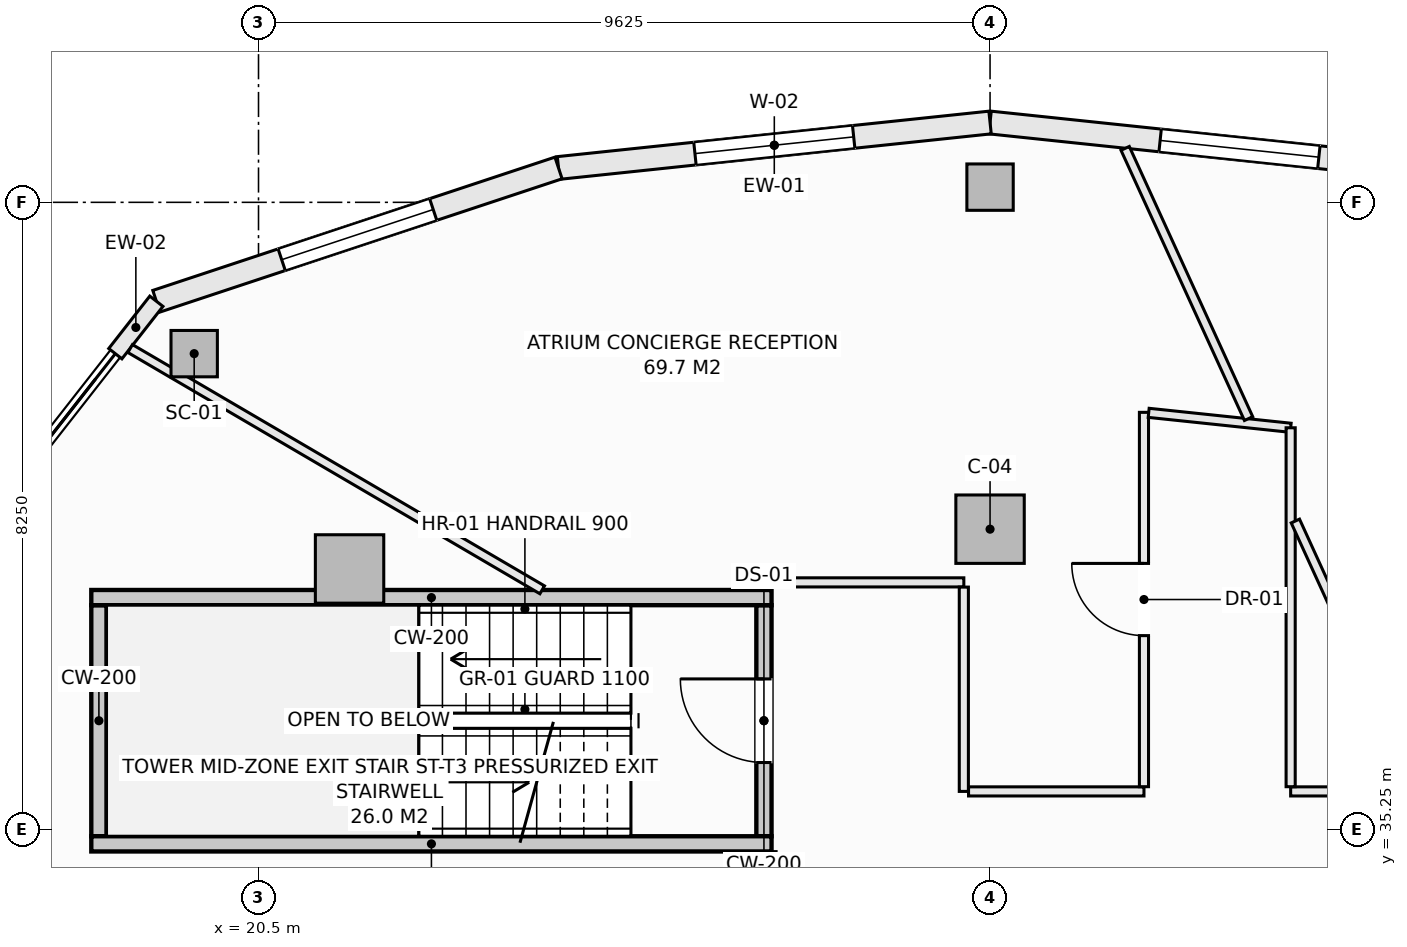
"""IFC4 building model, lengths in metres.
Left out: names, types, materials, properties, quantities, classifications, styles, units other than length and angle.
Written with IfcOpenShell. Run it as: python <this file> out.ifc"""

import sys

from ifc_helpers import new_model, si_unit, direction, frame, frame_2d, origin, origin_2d, place, context, subcontext, project, spatial, rectangle, hollow_rectangle, extrude, element, fill, save


model = new_model("IFC4")
c1 = context("Model", 3, precision=1e-05, world=origin(), true_north=direction((0.0, 1.0)))
c2 = subcontext(c1, "Body", "Model", "MODEL_VIEW")
j1 = project(units=[si_unit("LENGTHUNIT", "METRE"), si_unit("PLANEANGLEUNIT", "RADIAN")], contexts=[c1])
p1 = place(None, origin())
s1 = spatial("IfcSite", under=j1, at=p1, CompositionType="ELEMENT")
p2 = place(p1, origin())
s2 = spatial("IfcBuilding", under=s1, at=p2, CompositionType="ELEMENT")
p3 = place(p2, frame((0.0, 0.0, 142.7)))
s3 = spatial("IfcBuildingStorey", under=s2, at=p3, CompositionType="ELEMENT", Elevation=142.7)
for number, where, z_axis, x_axis in (
    (1, (30.125, 43.7, -0.27), (0.0, 0.0, 1.0), (1.0, 0.0, 0.0)),
    (2, (19.654, 41.51, -0.27), (0.0, 0.0, 1.0), (1.0, 0.0, 0.0)),
):
    element("IfcColumn", number, at=place(p3, frame(where, z_axis=z_axis, x_axis=x_axis)), inside=s3, PredefinedType="COLUMN", context=c2, shape_type="SweptSolid", body=[
        extrude(hollow_rectangle(XDim=0.61, YDim=0.61, WallThickness=0.025, at=origin_2d()), origin(), (0.0, 0.0, 1.0), 3.4),
    ])
for number, where, z_axis, x_axis in (
    (3, (30.125, 39.2, -0.27), (0.0, 0.0, 1.0), (1.0, 0.0, 0.0)),
    (4, (21.698, 38.677, -0.27), (0.0, 0.0, 1.0), (1.0, 0.0, 0.0)),
):
    element("IfcColumn", number, at=place(p3, frame(where, z_axis=z_axis, x_axis=x_axis)), inside=s3, PredefinedType="COLUMN", context=c2, shape_type="SweptSolid", body=[
        extrude(rectangle(XDim=0.9, YDim=0.9, at=origin_2d()), origin(), (0.0, 0.0, 1.0), 3.4),
    ])
p4 = place(p3, frame((30.125, 44.55, 0.0), z_axis=(0.0, 0.0, 1.0), x_axis=(0.994496545245, -0.104769372887, 0.0)))
e5 = element("IfcWall", 5, at=p4, inside=s3, PredefinedType="SOLIDWALL", context=c2, shape_type="SweptSolid", body=[
    extrude(rectangle(XDim=5.709, YDim=0.3, at=frame_2d((2.854, 0.0))), origin(), (0.0, 0.0, 1.0), 2.653),
])
p5 = place(p4, frame((2.25, 0.0, 0.74)))
e6 = element("IfcOpeningElement", 6, at=p5, cuts=e5, PredefinedType="OPENING", context=c2, shape_type="SweptSolid", body=[
    extrude(rectangle(XDim=2.1, YDim=1.7, at=frame_2d((1.05, 0.85))), frame((0.0, 0.16, 0.0), z_axis=(0.0, -1.0, 0.0), x_axis=(1.0, 0.0, 0.0)), (0.0, 0.0, 1.0), 0.32),
])
p6 = place(p3, frame((24.447, 43.952, 0.0), z_axis=(0.0, 0.0, 1.0), x_axis=(0.994496545245, 0.104769372887, 0.0)))
e7 = element("IfcWall", 7, at=p6, inside=s3, PredefinedType="SOLIDWALL", context=c2, shape_type="SweptSolid", body=[
    extrude(rectangle(XDim=5.709, YDim=0.3, at=frame_2d((2.854, 0.0))), origin(), (0.0, 0.0, 1.0), 2.653),
])
p7 = place(p6, frame((1.805, 0.0, 0.74)))
e8 = element("IfcOpeningElement", 8, at=p7, cuts=e7, PredefinedType="OPENING", context=c2, shape_type="SweptSolid", body=[
    extrude(rectangle(XDim=2.1, YDim=1.7, at=frame_2d((1.05, 0.85))), frame((0.0, 0.16, 0.0), z_axis=(0.0, -1.0, 0.0), x_axis=(1.0, 0.0, 0.0)), (0.0, 0.0, 1.0), 0.32),
])
p8 = place(p3, frame((19.156, 42.199, 0.0), z_axis=(0.0, 0.0, 1.0), x_axis=(0.949246811547, 0.314532177636, 0.0)))
e9 = element("IfcWall", 9, at=p8, inside=s3, PredefinedType="SOLIDWALL", context=c2, shape_type="SweptSolid", body=[
    extrude(rectangle(XDim=5.574, YDim=0.3, at=frame_2d((2.787, 0.0))), origin(), (0.0, 0.0, 1.0), 2.653),
])
p9 = place(p8, frame((1.737, 0.0, 0.74)))
e10 = element("IfcOpeningElement", 10, at=p9, cuts=e9, PredefinedType="OPENING", context=c2, shape_type="SweptSolid", body=[
    extrude(rectangle(XDim=2.1, YDim=1.7, at=frame_2d((1.05, 0.85))), frame((0.0, 0.16, 0.0), z_axis=(0.0, -1.0, 0.0), x_axis=(1.0, 0.0, 0.0)), (0.0, 0.0, 1.0), 0.32),
])
p10 = place(p3, frame((18.616, 41.509, 0.0), z_axis=(0.0, 0.0, 1.0), x_axis=(0.616368366719, 0.787457958566, 0.0)))
e11 = element("IfcWall", 11, at=p10, inside=s3, PredefinedType="SOLIDWALL", context=c2, shape_type="SweptSolid", body=[
    extrude(rectangle(XDim=0.876, YDim=0.22, at=frame_2d((0.438, 0.0))), origin(), (0.0, 0.0, 1.0), 2.653),
])
p11 = place(p3, frame((27.15, 35.16, -0.27), z_axis=(0.0, 0.0, 1.0), x_axis=(0.0, 1.0, 0.0)))
e12 = element("IfcWall", 12, at=p11, inside=s3, PredefinedType="SHEAR", context=c2, shape_type="SweptSolid", body=[
    extrude(rectangle(XDim=3.04, YDim=0.2, at=frame_2d((1.52, 0.0))), origin(), (0.0, 0.0, 1.0), 3.4),
])
p12 = place(p11, frame((0.97, 0.0, 0.27)))
e13 = element("IfcOpeningElement", 13, at=p12, cuts=e12, PredefinedType="OPENING", context=c2, shape_type="SweptSolid", body=[
    extrude(rectangle(XDim=1.1, YDim=2.15, at=frame_2d((0.55, 1.075))), frame((0.0, 0.11, 0.0), z_axis=(0.0, -1.0, 0.0), x_axis=(1.0, 0.0, 0.0)), (0.0, 0.0, 1.0), 0.22),
])
p13 = place(p3, frame((18.4, 35.16, -0.27), z_axis=(0.0, 0.0, 1.0), x_axis=(0.0, 1.0, 0.0)))
e14 = element("IfcWall", 14, at=p13, inside=s3, PredefinedType="SHEAR", context=c2, shape_type="SweptSolid", body=[
    extrude(rectangle(XDim=3.04, YDim=0.2, at=frame_2d((1.52, 0.0))), origin(), (0.0, 0.0, 1.0), 3.4),
])
for number, where, z_axis, x_axis in (
    (15, (18.3, 38.3, -0.27), (0.0, 0.0, 1.0), (1.0, 0.0, 0.0)),
    (16, (18.3, 35.06, -0.27), (0.0, 0.0, 1.0), (1.0, 0.0, 0.0)),
):
    element("IfcWall", number, at=place(p3, frame(where, z_axis=z_axis, x_axis=x_axis)), inside=s3, PredefinedType="SHEAR", context=c2, shape_type="SweptSolid", body=[
        extrude(rectangle(XDim=8.95, YDim=0.2, at=frame_2d((4.475, 0.0))), origin(), (0.0, 0.0, 1.0), 3.4),
    ])
p14 = place(p3, frame((27.25, 34.152, 0.0), z_axis=(0.0, 0.0, 1.0), x_axis=(0.0, 1.0, 0.0)))
e17 = element("IfcWall", 17, at=p14, inside=s3, PredefinedType="PARTITIONING", context=c2, shape_type="SweptSolid", body=[
    extrude(rectangle(XDim=0.806, YDim=0.12, at=frame_2d((0.403, 0.0))), origin(), (0.0, 0.0, 1.0), 3.13),
])
p15 = place(p3, frame((27.25, 38.5, 0.0), z_axis=(0.0, 0.0, 1.0), x_axis=(1.0, 0.0, 0.0)))
e18 = element("IfcWall", 18, at=p15, inside=s3, PredefinedType="PARTITIONING", context=c2, shape_type="SweptSolid", body=[
    extrude(rectangle(XDim=2.53, YDim=0.12, at=frame_2d((1.265, 0.0))), origin(), (0.0, 0.0, 1.0), 3.13),
])
p16 = place(p3, frame((29.78, 35.75, 0.0), z_axis=(0.0, 0.0, 1.0), x_axis=(0.0, 1.0, 0.0)))
e19 = element("IfcWall", 19, at=p16, inside=s3, PredefinedType="PARTITIONING", context=c2, shape_type="SweptSolid", body=[
    extrude(rectangle(XDim=2.688, YDim=0.12, at=frame_2d((1.344, 0.0))), origin(), (0.0, 0.0, 1.0), 3.13),
])
p17 = place(p3, frame((29.842, 35.75, 0.0), z_axis=(0.0, 0.0, 1.0), x_axis=(1.0, 0.0, 0.0)))
e20 = element("IfcWall", 20, at=p17, inside=s3, PredefinedType="PARTITIONING", context=c2, shape_type="SweptSolid", body=[
    extrude(rectangle(XDim=2.308, YDim=0.12, at=frame_2d((1.154, 0.0))), origin(), (0.0, 0.0, 1.0), 3.13),
])
p18 = place(p3, frame((34.08, 35.75, 0.0), z_axis=(0.0, 0.0, 1.0), x_axis=(1.0, 0.0, 0.0)))
e21 = element("IfcWall", 21, at=p18, inside=s3, PredefinedType="PARTITIONING", context=c2, shape_type="SweptSolid", body=[
    extrude(rectangle(XDim=4.878, YDim=0.12, at=frame_2d((2.439, 0.0))), origin(), (0.0, 0.0, 1.0), 2.505),
])
p19 = place(p3, frame((32.15, 35.812, 0.0), z_axis=(0.0, 0.0, 1.0), x_axis=(0.0, 1.0, 0.0)))
e22 = element("IfcWall", 22, at=p19, inside=s3, PredefinedType="PARTITIONING", context=c2, shape_type="SweptSolid", body=[
    extrude(rectangle(XDim=4.925, YDim=0.12, at=frame_2d((2.462, 0.0))), origin(), (0.0, 0.0, 1.0), 3.13),
])
p20 = place(p19, frame((1.988, 0.0, 0.0)))
e23 = element("IfcOpeningElement", 23, at=p20, cuts=e22, PredefinedType="OPENING", context=c2, shape_type="SweptSolid", body=[
    extrude(rectangle(XDim=0.95, YDim=2.1, at=frame_2d((0.475, 1.05))), frame((0.0, 0.07, 0.0), z_axis=(0.0, -1.0, 0.0), x_axis=(1.0, 0.0, 0.0)), (0.0, 0.0, 1.0), 0.14),
])
p21 = place(p3, frame((32.212, 40.73, 0.0), z_axis=(0.0, 0.0, 1.0), x_axis=(0.994511860417, -0.104623895405, 0.0)))
e24 = element("IfcWall", 24, at=p21, inside=s3, PredefinedType="PARTITIONING", context=c2, shape_type="SweptSolid", body=[
    extrude(rectangle(XDim=1.878, YDim=0.12, at=frame_2d((0.939, 0.0))), origin(), (0.0, 0.0, 1.0), 3.13),
])
p22 = place(p3, frame((34.08, 35.812, 0.0), z_axis=(0.0, 0.0, 1.0), x_axis=(0.0, 1.0, 0.0)))
e25 = element("IfcWall", 25, at=p22, inside=s3, PredefinedType="PARTITIONING", context=c2, shape_type="SweptSolid", body=[
    extrude(rectangle(XDim=4.722, YDim=0.12, at=frame_2d((2.361, 0.0))), origin(), (0.0, 0.0, 1.0), 2.812),
])
p23 = place(p3, frame((18.811, 41.576, 0.0), z_axis=(0.0, 0.0, 1.0), x_axis=(0.862957437205, -0.505276618866, 0.0)))
e26 = element("IfcWall", 26, at=p23, inside=s3, PredefinedType="PARTITIONING", context=c2, shape_type="SweptSolid", body=[
    extrude(rectangle(XDim=6.282, YDim=0.12, at=frame_2d((3.141, 0.0))), origin(), (0.0, 0.0, 1.0), 2.505),
])
p24 = place(p3, frame((31.902, 44.21, 0.0), z_axis=(0.0, 0.0, 1.0), x_axis=(0.41553391135, -0.909577686907, 0.0)))
e27 = element("IfcWall", 27, at=p24, inside=s3, PredefinedType="PARTITIONING", context=c2, shape_type="SweptSolid", body=[
    extrude(rectangle(XDim=3.909, YDim=0.12, at=frame_2d((1.955, 0.0))), origin(), (0.0, 0.0, 1.0), 3.13),
])
p25 = place(p3, frame((34.142, 39.307, 0.0), z_axis=(0.0, 0.0, 1.0), x_axis=(0.415501495917, -0.909592494962, 0.0)))
e28 = element("IfcWall", 28, at=p25, inside=s3, PredefinedType="PARTITIONING", context=c2, shape_type="SweptSolid", body=[
    extrude(rectangle(XDim=3.843, YDim=0.12, at=frame_2d((1.921, 0.0))), origin(), (0.0, 0.0, 1.0), 3.13),
])
p26 = place(p5, origin())
e29 = element("IfcWindow", 29, at=p26, inside=s3, PartitioningType="SINGLE_PANEL", PredefinedType="WINDOW", context=c2, shape_type="SweptSolid", body=[
    extrude(rectangle(XDim=2.1, YDim=1.7, at=frame_2d((1.05, 0.85))), frame((0.0, 0.03, 0.0), z_axis=(0.0, -1.0, 0.0), x_axis=(1.0, 0.0, 0.0)), (0.0, 0.0, 1.0), 0.06),
])
fill(e6, e29)
p27 = place(p7, origin())
e30 = element("IfcWindow", 30, at=p27, inside=s3, PartitioningType="SINGLE_PANEL", PredefinedType="WINDOW", context=c2, shape_type="SweptSolid", body=[
    extrude(rectangle(XDim=2.1, YDim=1.7, at=frame_2d((1.05, 0.85))), frame((0.0, 0.03, 0.0), z_axis=(0.0, -1.0, 0.0), x_axis=(1.0, 0.0, 0.0)), (0.0, 0.0, 1.0), 0.06),
])
fill(e8, e30)
p28 = place(p9, origin())
e31 = element("IfcWindow", 31, at=p28, inside=s3, PartitioningType="SINGLE_PANEL", PredefinedType="WINDOW", context=c2, shape_type="SweptSolid", body=[
    extrude(rectangle(XDim=2.1, YDim=1.7, at=frame_2d((1.05, 0.85))), frame((0.0, 0.03, 0.0), z_axis=(0.0, -1.0, 0.0), x_axis=(1.0, 0.0, 0.0)), (0.0, 0.0, 1.0), 0.06),
])
fill(e10, e31)
p29 = place(p12, origin())
e32 = element("IfcDoor", 32, at=p29, inside=s3, OperationType="SINGLE_SWING_RIGHT", PredefinedType="DOOR", context=c2, shape_type="SweptSolid", body=[
    extrude(rectangle(XDim=1.1, YDim=2.15, at=frame_2d((0.55, 1.075))), frame((0.0, 0.025, 0.0), z_axis=(0.0, -1.0, 0.0), x_axis=(1.0, 0.0, 0.0)), (0.0, 0.0, 1.0), 0.05),
])
fill(e13, e32)
p30 = place(p20, origin())
e33 = element("IfcDoor", 33, at=p30, inside=s3, OperationType="SINGLE_SWING_RIGHT", PredefinedType="DOOR", context=c2, shape_type="SweptSolid", body=[
    extrude(rectangle(XDim=0.95, YDim=2.1, at=frame_2d((0.475, 1.05))), frame((0.0, 0.025, 0.0), z_axis=(0.0, -1.0, 0.0), x_axis=(1.0, 0.0, 0.0)), (0.0, 0.0, 1.0), 0.05),
])
fill(e23, e33)
save(model, sys.argv[1])
